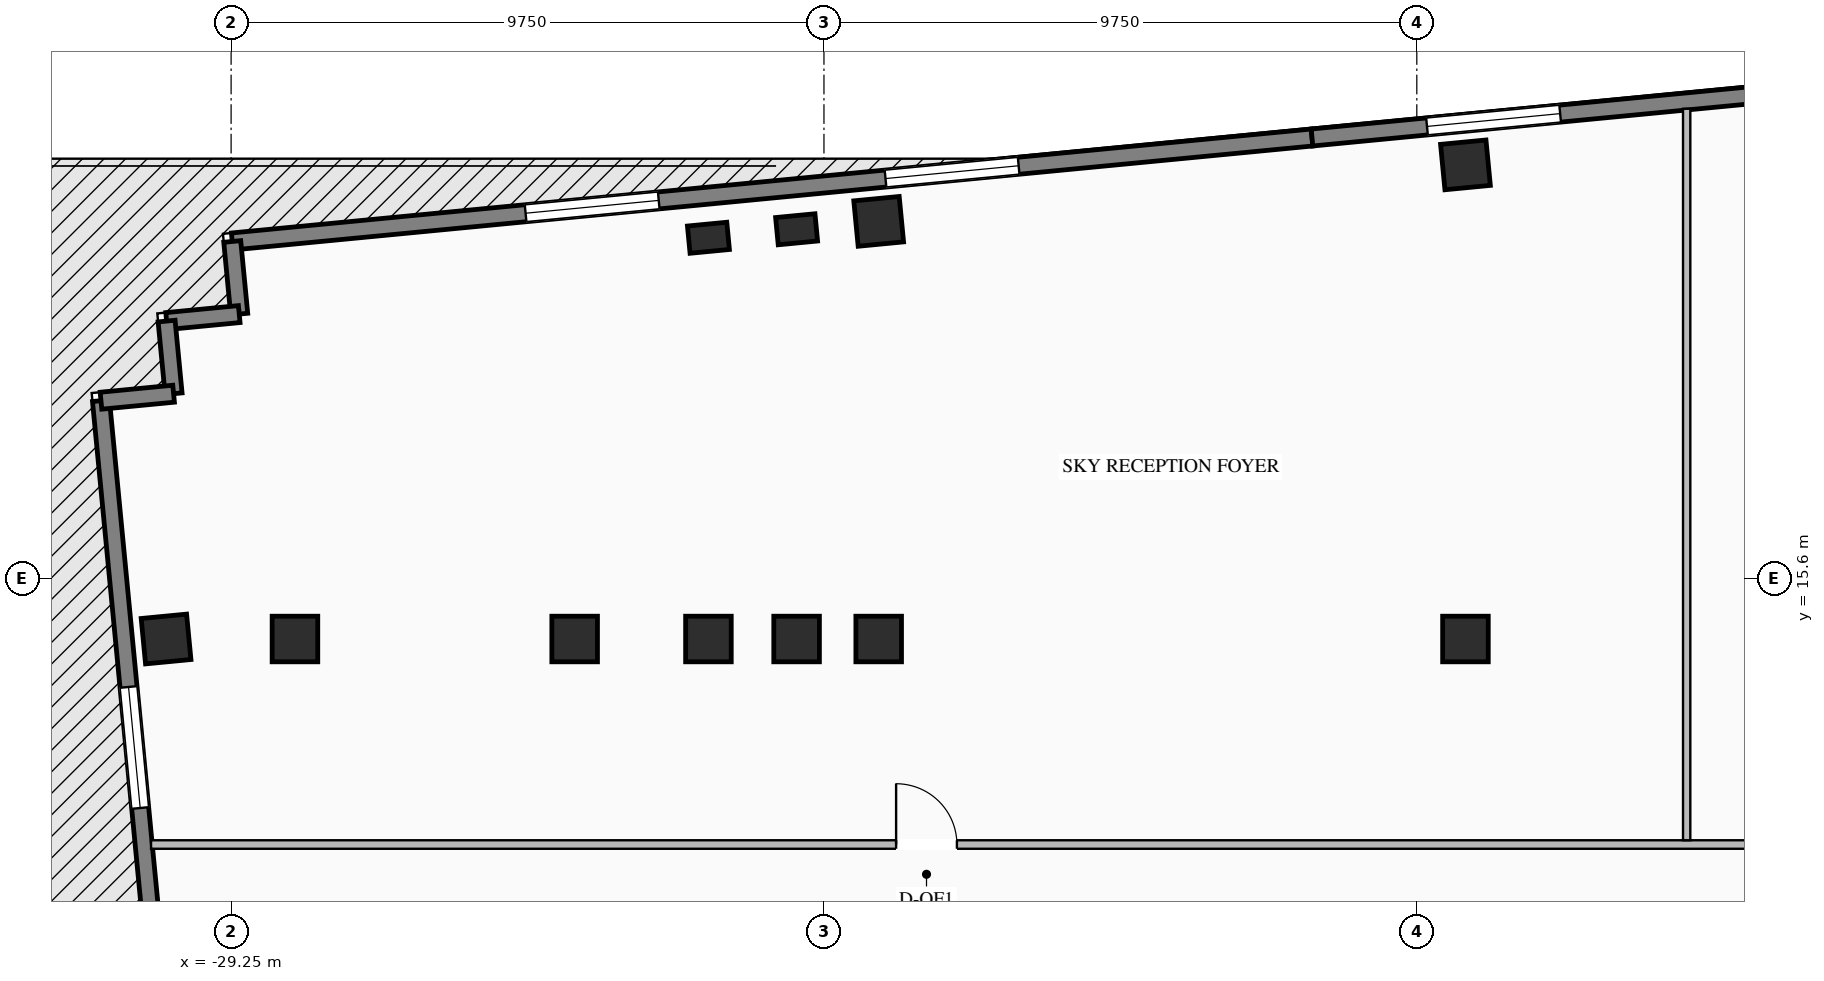
"""IFC4 building model, lengths in metres.
Left out: names, types, materials, properties, quantities, classifications, styles, units other than length and angle.
Written with IfcOpenShell. Run it as: python <this file> out.ifc"""

import sys

from ifc_helpers import new_model, si_unit, direction, frame, frame_2d, origin, origin_2d, place, context, subcontext, project, spatial, rectangle, i_section, extrude, element, fill, save


model = new_model("IFC4")
c1 = context("Model", 3, precision=1e-05, world=origin(), true_north=direction((0.0, 1.0)))
c2 = subcontext(c1, "Body", "Model", "MODEL_VIEW")
j1 = project(units=[si_unit("LENGTHUNIT", "METRE"), si_unit("PLANEANGLEUNIT", "RADIAN")], contexts=[c1])
p1 = place(None, origin())
s1 = spatial("IfcSite", under=j1, at=p1, CompositionType="ELEMENT")
p2 = place(p1, origin())
s2 = spatial("IfcBuilding", under=s1, at=p2, CompositionType="ELEMENT")
p3 = place(p2, frame((0.0, 0.0, 70.0)))
s3 = spatial("IfcBuildingStorey", under=s2, at=p3, CompositionType="ELEMENT", Elevation=70.0)
for number, where, z_axis, x_axis in (
    (1, (-21.4, 14.6, 0.0), (0.0, 0.0, 1.0), (1.0, 0.0, 0.0)),
    (2, (-19.95, 14.6, 0.0), (0.0, 0.0, 1.0), (1.0, 0.0, 0.0)),
    (3, (-18.6, 14.6, 0.0), (0.0, 0.0, 1.0), (1.0, 0.0, 0.0)),
    (4, (-8.95, 14.6, 0.0), (0.0, 0.0, 1.0), (1.0, 0.0, 0.0)),
    (5, (-23.6, 14.6, 0.0), (0.0, 0.0, 1.0), (1.0, 0.0, 0.0)),
    (6, (-28.2, 14.6, 0.0), (0.0, 0.0, 1.0), (1.0, 0.0, 0.0)),
    (7, (-18.6, 21.469, 0.0), (0.0, 0.0, 1.0), (0.995, 0.096, 0.0)),
    (8, (-8.95, 22.398, 0.0), (0.0, 0.0, 1.0), (0.995, 0.096, 0.0)),
):
    element("IfcColumn", number, at=place(p3, frame(where, z_axis=z_axis, x_axis=x_axis)), inside=s3, PredefinedType="COLUMN", context=c2, shape_type="SweptSolid", body=[
        extrude(i_section(OverallWidth=0.75, OverallDepth=0.75, WebThickness=0.03, FlangeThickness=0.044, at=origin_2d()), origin(), (0.0, 0.0, 1.0), 4.2),
    ])
p4 = place(p3, frame((-30.32, 14.6, -0.28), z_axis=(0.0, 0.0, 1.0), x_axis=(0.995396198367, 0.09584575252, 0.0)))
e9 = element("IfcColumn", 9, at=p4, inside=s3, PredefinedType="COLUMN", context=c2, shape_type="SweptSolid", body=[
    extrude(i_section(OverallWidth=0.75, OverallDepth=0.75, WebThickness=0.03, FlangeThickness=0.044, at=origin_2d()), origin(), (0.0, 0.0, 1.0), 4.48),
])
for number, where, z_axis, x_axis in (
    (10, (-21.4, 21.199, 0.0), (0.0, 0.0, 1.0), (0.995, 0.096, 0.0)),
    (11, (-19.95, 21.339, 0.0), (0.0, 0.0, 1.0), (0.995, 0.096, 0.0)),
):
    element("IfcColumn", number, at=place(p3, frame(where, z_axis=z_axis, x_axis=x_axis)), inside=s3, PredefinedType="PILASTER", context=c2, shape_type="SweptSolid", body=[
        extrude(rectangle(XDim=0.65, YDim=0.45, at=origin_2d()), origin(), (0.0, 0.0, 1.0), 4.2),
    ])
p5 = place(p3, frame((-29.231, 21.138, 0.0), z_axis=(0.0, 0.0, 1.0), x_axis=(0.995395780835, 0.095850088663, 0.0)))
e12 = element("IfcWall", 12, at=p5, inside=s3, PredefinedType="STANDARD", context=c2, shape_type="SweptSolid", body=[
    extrude(rectangle(XDim=17.84, YDim=0.28, at=frame_2d((8.92, 0.0))), origin(), (0.0, 0.0, 1.0), 4.0),
])
p6 = place(p5, frame((4.847, 0.0, 0.76)))
e13 = element("IfcOpeningElement", 13, at=p6, cuts=e12, PredefinedType="OPENING", context=c2, shape_type="SweptSolid", body=[
    extrude(rectangle(XDim=2.2, YDim=2.25, at=frame_2d((1.1, 1.125))), frame((0.0, 0.15, 0.0), z_axis=(0.0, -1.0, 0.0), x_axis=(1.0, 0.0, 0.0)), (0.0, 0.0, 1.0), 0.3),
])
p7 = place(p5, frame((10.793, 0.0, 0.76)))
e14 = element("IfcOpeningElement", 14, at=p7, cuts=e12, PredefinedType="OPENING", context=c2, shape_type="SweptSolid", body=[
    extrude(rectangle(XDim=2.2, YDim=2.25, at=frame_2d((1.1, 1.125))), frame((0.0, 0.15, 0.0), z_axis=(0.0, -1.0, 0.0), x_axis=(1.0, 0.0, 0.0)), (0.0, 0.0, 1.0), 0.3),
])
p8 = place(p3, frame((-11.474, 22.848, 0.0), z_axis=(0.0, 0.0, 1.0), x_axis=(0.995396794462, 0.09583956164, 0.0)))
e15 = element("IfcWall", 15, at=p8, inside=s3, PredefinedType="STANDARD", context=c2, shape_type="SweptSolid", body=[
    extrude(rectangle(XDim=9.0, YDim=0.28, at=frame_2d((4.5, 0.0))), origin(), (0.0, 0.0, 1.0), 4.0),
])
p9 = place(p8, frame((1.9, 0.0, 0.76)))
e16 = element("IfcOpeningElement", 16, at=p9, cuts=e15, PredefinedType="OPENING", context=c2, shape_type="SweptSolid", body=[
    extrude(rectangle(XDim=2.2, YDim=2.25, at=frame_2d((1.1, 1.125))), frame((0.0, 0.15, 0.0), z_axis=(0.0, -1.0, 0.0), x_axis=(1.0, 0.0, 0.0)), (0.0, 0.0, 1.0), 0.3),
])
p10 = place(p3, frame((-29.585, -0.234, 0.0), z_axis=(0.0, 0.0, 1.0), x_axis=(-0.095841297881, 0.99539662729, 0.0)))
e17 = element("IfcWall", 17, at=p10, inside=s3, PredefinedType="STANDARD", context=c2, shape_type="SweptSolid", body=[
    extrude(rectangle(XDim=18.84, YDim=0.28, at=frame_2d((9.42, 0.0))), origin(), (0.0, 0.0, 1.0), 4.0),
])
p11 = place(p10, frame((5.28, 0.0, 0.76)))
e18 = element("IfcOpeningElement", 18, at=p11, cuts=e17, PredefinedType="OPENING", context=c2, shape_type="SweptSolid", body=[
    extrude(rectangle(XDim=2.0, YDim=2.05, at=frame_2d((1.0, 1.025))), frame((0.0, 0.15, 0.0), z_axis=(0.0, -1.0, 0.0), x_axis=(1.0, 0.0, 0.0)), (0.0, 0.0, 1.0), 0.3),
])
p12 = place(p10, frame((12.11, 0.0, 0.76)))
e19 = element("IfcOpeningElement", 19, at=p12, cuts=e17, PredefinedType="OPENING", context=c2, shape_type="SweptSolid", body=[
    extrude(rectangle(XDim=2.0, YDim=2.05, at=frame_2d((1.0, 1.025))), frame((0.0, 0.15, 0.0), z_axis=(0.0, -1.0, 0.0), x_axis=(1.0, 0.0, 0.0)), (0.0, 0.0, 1.0), 0.3),
])
for number, where, z_axis, x_axis in (
    (20, (-29.231, 21.138, 0.0), (0.0, 0.0, 1.0), (0.096, -0.995, 0.0)),
    (21, (-29.116, 19.944, 0.0), (0.0, 0.0, 1.0), (-0.995, -0.096, 0.0)),
):
    element("IfcWall", number, at=place(p3, frame(where, z_axis=z_axis, x_axis=x_axis)), inside=s3, PredefinedType="STANDARD", context=c2, shape_type="SweptSolid", body=[
        extrude(rectangle(XDim=1.2, YDim=0.28, at=frame_2d((0.6, 0.0))), origin(), (0.0, 0.0, 1.0), 4.0),
    ])
for number, where, z_axis, x_axis in (
    (22, (-30.311, 19.829, 0.0), (0.0, 0.0, 1.0), (0.096, -0.995, 0.0)),
    (23, (-30.196, 18.635, 0.0), (0.0, 0.0, 1.0), (-0.995, -0.096, 0.0)),
):
    element("IfcWall", number, at=place(p3, frame(where, z_axis=z_axis, x_axis=x_axis)), inside=s3, PredefinedType="STANDARD", context=c2, shape_type="SweptSolid", body=[
        extrude(rectangle(XDim=1.2, YDim=0.28, at=frame_2d((0.6, 0.0))), origin(), (0.0, 0.0, 1.0), 4.0),
    ])
p13 = place(p3, frame((-30.567, 11.22, 0.0), z_axis=(0.0, 0.0, 1.0), x_axis=(1.0, 0.0, 0.0)))
e24 = element("IfcWall", 24, at=p13, inside=s3, PredefinedType="STANDARD", context=c2, shape_type="SweptSolid", body=[
    extrude(rectangle(XDim=67.551, YDim=0.14, at=frame_2d((33.775, 0.0))), origin(), (0.0, 0.0, 1.0), 4.0),
])
p14 = place(p13, frame((12.253, 0.0, 0.0)))
e25 = element("IfcOpeningElement", 25, at=p14, cuts=e24, PredefinedType="OPENING", context=c2, shape_type="SweptSolid", body=[
    extrude(rectangle(XDim=1.0, YDim=2.08, at=frame_2d((0.5, 1.04))), frame((0.0, 0.08, 0.0), z_axis=(0.0, -1.0, 0.0), x_axis=(1.0, 0.0, 0.0)), (0.0, 0.0, 1.0), 0.16),
])
p15 = place(p13, frame((45.777, 0.0, 0.0)))
e26 = element("IfcOpeningElement", 26, at=p15, cuts=e24, PredefinedType="OPENING", context=c2, shape_type="SweptSolid", body=[
    extrude(rectangle(XDim=1.0, YDim=2.08, at=frame_2d((0.5, 1.04))), frame((0.0, 0.08, 0.0), z_axis=(0.0, -1.0, 0.0), x_axis=(1.0, 0.0, 0.0)), (0.0, 0.0, 1.0), 0.16),
])
p16 = place(p3, frame((-5.312, 11.29, 0.0), z_axis=(0.0, 0.0, 1.0), x_axis=(0.0, 1.0, 0.0)))
e27 = element("IfcWall", 27, at=p16, inside=s3, PredefinedType="STANDARD", context=c2, shape_type="SweptSolid", body=[
    extrude(rectangle(XDim=12.031, YDim=0.12, at=frame_2d((6.016, 0.0))), origin(), (0.0, 0.0, 1.0), 4.0),
])
p17 = place(p6, origin())
e28 = element("IfcWindow", 28, at=p17, inside=s3, PartitioningType="DOUBLE_PANEL_VERTICAL", PredefinedType="WINDOW", context=c2, shape_type="SweptSolid", body=[
    extrude(rectangle(XDim=2.2, YDim=2.25, at=frame_2d((1.1, 1.125))), frame((0.0, 0.03, 0.0), z_axis=(0.0, -1.0, 0.0), x_axis=(1.0, 0.0, 0.0)), (0.0, 0.0, 1.0), 0.06),
])
fill(e13, e28)
p18 = place(p7, origin())
e29 = element("IfcWindow", 29, at=p18, inside=s3, PartitioningType="DOUBLE_PANEL_VERTICAL", PredefinedType="WINDOW", context=c2, shape_type="SweptSolid", body=[
    extrude(rectangle(XDim=2.2, YDim=2.25, at=frame_2d((1.1, 1.125))), frame((0.0, 0.03, 0.0), z_axis=(0.0, -1.0, 0.0), x_axis=(1.0, 0.0, 0.0)), (0.0, 0.0, 1.0), 0.06),
])
fill(e14, e29)
p19 = place(p9, origin())
e30 = element("IfcWindow", 30, at=p19, inside=s3, PartitioningType="DOUBLE_PANEL_VERTICAL", PredefinedType="WINDOW", context=c2, shape_type="SweptSolid", body=[
    extrude(rectangle(XDim=2.2, YDim=2.25, at=frame_2d((1.1, 1.125))), frame((0.0, 0.03, 0.0), z_axis=(0.0, -1.0, 0.0), x_axis=(1.0, 0.0, 0.0)), (0.0, 0.0, 1.0), 0.06),
])
fill(e16, e30)
p20 = place(p12, origin())
e31 = element("IfcWindow", 31, at=p20, inside=s3, PartitioningType="DOUBLE_PANEL_VERTICAL", PredefinedType="WINDOW", context=c2, shape_type="SweptSolid", body=[
    extrude(rectangle(XDim=2.0, YDim=2.05, at=frame_2d((1.0, 1.025))), frame((0.0, 0.03, 0.0), z_axis=(0.0, -1.0, 0.0), x_axis=(1.0, 0.0, 0.0)), (0.0, 0.0, 1.0), 0.06),
])
fill(e19, e31)
p21 = place(p14, origin())
e32 = element("IfcDoor", 32, at=p21, inside=s3, OperationType="SINGLE_SWING_LEFT", PredefinedType="DOOR", context=c2, shape_type="SweptSolid", body=[
    extrude(rectangle(XDim=1.0, YDim=2.08, at=frame_2d((0.5, 1.04))), frame((0.0, 0.025, 0.0), z_axis=(0.0, -1.0, 0.0), x_axis=(1.0, 0.0, 0.0)), (0.0, 0.0, 1.0), 0.05),
])
fill(e25, e32)
save(model, sys.argv[1])
